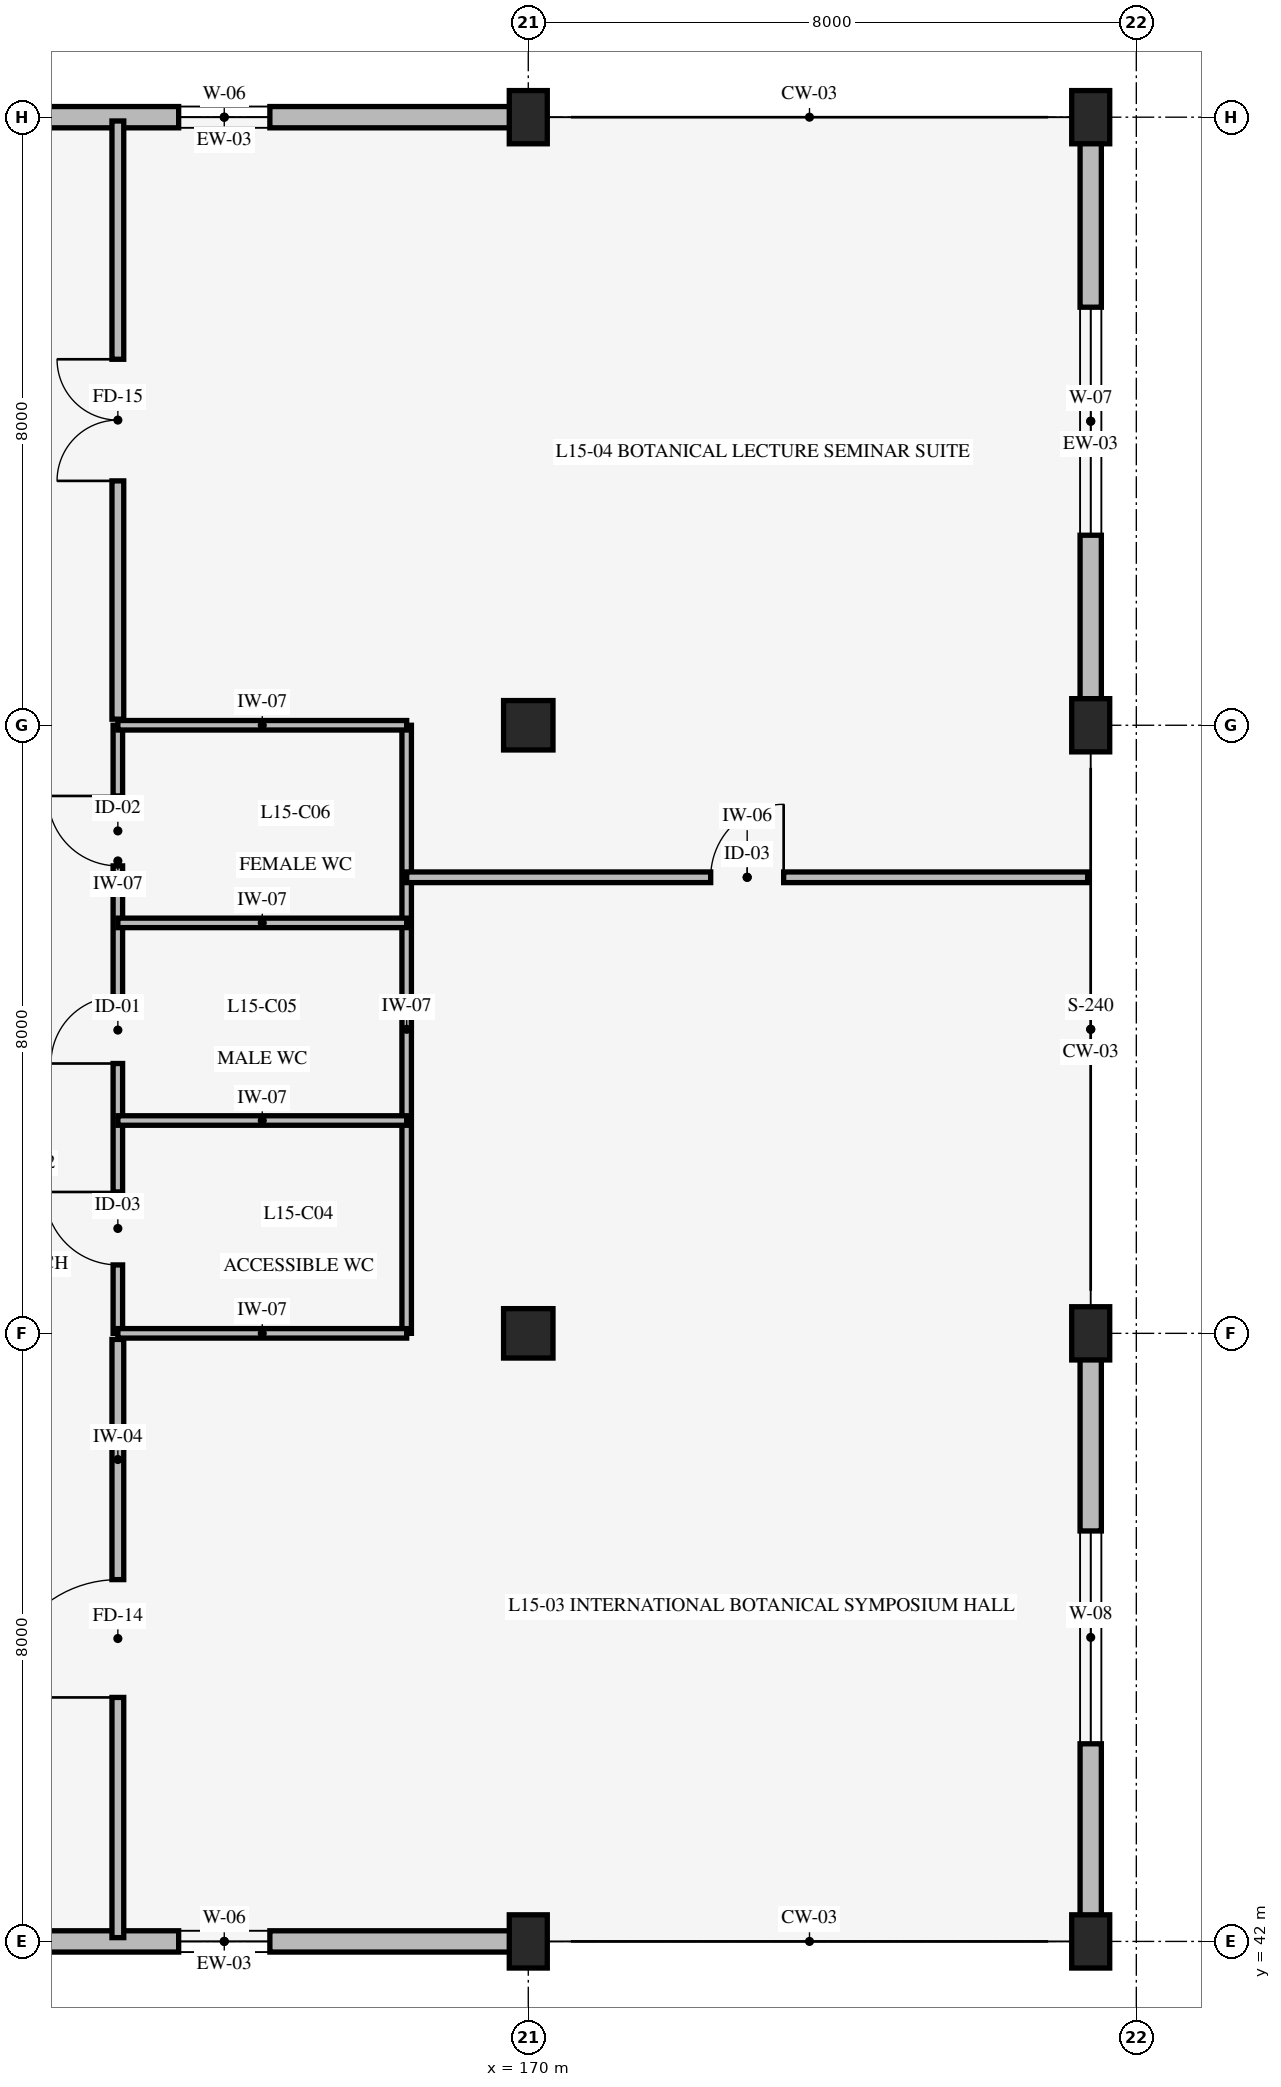
"""IFC4 building model, lengths in metres.
Left out: names, types, materials, properties, quantities, classifications, styles, units other than length and angle.
Written with IfcOpenShell. Run it as: python <this file> out.ifc"""

import sys

from ifc_helpers import new_model, si_unit, direction, frame, frame_2d, origin, origin_2d, place, context, subcontext, project, spatial, rectangle, extrude, element, fill, save


model = new_model("IFC4")
c1 = context("Model", 3, precision=1e-05, world=origin(), true_north=direction((0.0, 1.0)))
c2 = subcontext(c1, "Body", "Model", "MODEL_VIEW")
j1 = project(units=[si_unit("LENGTHUNIT", "METRE"), si_unit("PLANEANGLEUNIT", "RADIAN")], contexts=[c1])
p1 = place(None, origin())
s1 = spatial("IfcSite", under=j1, at=p1, CompositionType="ELEMENT")
p2 = place(p1, origin())
s2 = spatial("IfcBuilding", under=s1, at=p2, CompositionType="ELEMENT")
p3 = place(p2, frame((0.0, 0.0, 61.2)))
s3 = spatial("IfcBuildingStorey", under=s2, at=p3, CompositionType="ELEMENT", Elevation=61.2)
p4 = place(p3, frame((170.0, 42.0, 0.0), z_axis=(0.0, 0.0, 1.0), x_axis=(1.0, 0.0, 0.0)))
e1 = element("IfcColumn", 1, at=p4, inside=s3, PredefinedType="COLUMN", context=c2, shape_type="SweptSolid", body=[
    extrude(rectangle(XDim=0.5, YDim=0.7, at=origin_2d()), origin(), (0.0, 0.0, 1.0), 4.2),
])
for number, where, z_axis, x_axis in (
    (2, (170.0, 50.0, 0.0), (0.0, 0.0, 1.0), (1.0, 0.0, 0.0)),
    (3, (170.0, 58.0, 0.0), (0.0, 0.0, 1.0), (1.0, 0.0, 0.0)),
):
    element("IfcColumn", number, at=place(p3, frame(where, z_axis=z_axis, x_axis=x_axis)), inside=s3, PredefinedType="COLUMN", context=c2, shape_type="SweptSolid", body=[
        extrude(rectangle(XDim=0.65, YDim=0.65, at=origin_2d()), origin(), (0.0, 0.0, 1.0), 4.2),
    ])
for number, where, z_axis, x_axis in (
    (4, (170.0, 66.0, 0.0), (0.0, 0.0, 1.0), (1.0, 0.0, 0.0)),
    (5, (177.4, 42.0, 0.0), (0.0, 0.0, 1.0), (1.0, 0.0, 0.0)),
    (6, (177.4, 50.0, 0.0), (0.0, 0.0, 1.0), (1.0, 0.0, 0.0)),
    (7, (177.4, 58.0, 0.0), (0.0, 0.0, 1.0), (1.0, 0.0, 0.0)),
    (8, (177.4, 66.0, 0.0), (0.0, 0.0, 1.0), (1.0, 0.0, 0.0)),
):
    element("IfcColumn", number, at=place(p3, frame(where, z_axis=z_axis, x_axis=x_axis)), inside=s3, PredefinedType="COLUMN", context=c2, shape_type="SweptSolid", body=[
        extrude(rectangle(XDim=0.5, YDim=0.7, at=origin_2d()), origin(), (0.0, 0.0, 1.0), 4.2),
    ])
p5 = place(p3, frame((170.0, 42.0, 0.0), z_axis=(0.0, 0.0, 1.0), x_axis=(-1.0, 0.0, 0.0)))
e9 = element("IfcWall", 9, at=p5, inside=s3, PredefinedType="STANDARD", context=c2, shape_type="SweptSolid", body=[
    extrude(rectangle(XDim=8.0, YDim=0.28, at=frame_2d((4.0, 0.0))), origin(), (0.0, 0.0, 1.0), 3.24),
])
p6 = place(p5, frame((3.4, 0.0, 0.85)))
e10 = element("IfcOpeningElement", 10, at=p6, cuts=e9, PredefinedType="OPENING", context=c2, shape_type="SweptSolid", body=[
    extrude(rectangle(XDim=1.2, YDim=1.2, at=frame_2d((0.6, 0.6))), frame((0.0, 0.15, 0.0), z_axis=(0.0, -1.0, 0.0), x_axis=(1.0, 0.0, 0.0)), (0.0, 0.0, 1.0), 0.3),
])
p7 = place(p3, frame((162.0, 66.0, 0.0), z_axis=(0.0, 0.0, 1.0), x_axis=(1.0, 0.0, 0.0)))
e11 = element("IfcWall", 11, at=p7, inside=s3, PredefinedType="STANDARD", context=c2, shape_type="SweptSolid", body=[
    extrude(rectangle(XDim=8.0, YDim=0.28, at=frame_2d((4.0, 0.0))), origin(), (0.0, 0.0, 1.0), 3.24),
])
p8 = place(p7, frame((3.4, 0.0, 0.85)))
e12 = element("IfcOpeningElement", 12, at=p8, cuts=e11, PredefinedType="OPENING", context=c2, shape_type="SweptSolid", body=[
    extrude(rectangle(XDim=1.2, YDim=1.2, at=frame_2d((0.6, 0.6))), frame((0.0, 0.15, 0.0), z_axis=(0.0, -1.0, 0.0), x_axis=(1.0, 0.0, 0.0)), (0.0, 0.0, 1.0), 0.3),
])
p9 = place(p3, frame((177.4, 66.0, 0.0), z_axis=(0.0, 0.0, 1.0), x_axis=(0.0, -1.0, 0.0)))
e13 = element("IfcWall", 13, at=p9, inside=s3, PredefinedType="STANDARD", context=c2, shape_type="SweptSolid", body=[
    extrude(rectangle(XDim=8.0, YDim=0.28, at=frame_2d((4.0, 0.0))), origin(), (0.0, 0.0, 1.0), 3.29),
])
p10 = place(p9, frame((2.5, 0.0, 0.85)))
e14 = element("IfcOpeningElement", 14, at=p10, cuts=e13, PredefinedType="OPENING", context=c2, shape_type="SweptSolid", body=[
    extrude(rectangle(XDim=3.0, YDim=1.8, at=frame_2d((1.5, 0.9))), frame((0.0, 0.15, 0.0), z_axis=(0.0, -1.0, 0.0), x_axis=(1.0, 0.0, 0.0)), (0.0, 0.0, 1.0), 0.3),
])
p11 = place(p3, frame((177.4, 50.0, 0.0), z_axis=(0.0, 0.0, 1.0), x_axis=(0.0, -1.0, 0.0)))
e15 = element("IfcWall", 15, at=p11, inside=s3, PredefinedType="STANDARD", context=c2, shape_type="SweptSolid", body=[
    extrude(rectangle(XDim=8.0, YDim=0.28, at=frame_2d((4.0, 0.0))), origin(), (0.0, 0.0, 1.0), 3.29),
])
p12 = place(p11, frame((2.6, 0.0, 0.85)))
e16 = element("IfcOpeningElement", 16, at=p12, cuts=e15, PredefinedType="OPENING", context=c2, shape_type="SweptSolid", body=[
    extrude(rectangle(XDim=2.8, YDim=1.6, at=frame_2d((1.4, 0.8))), frame((0.0, 0.15, 0.0), z_axis=(0.0, -1.0, 0.0), x_axis=(1.0, 0.0, 0.0)), (0.0, 0.0, 1.0), 0.3),
])
p13 = place(p3, frame((164.6, 50.0, 0.0), z_axis=(0.0, 0.0, 1.0), x_axis=(0.0, 1.0, 0.0)))
e17 = element("IfcWall", 17, at=p13, inside=s3, PredefinedType="STANDARD", context=c2, shape_type="SweptSolid", body=[
    extrude(rectangle(XDim=8.0, YDim=0.125, at=frame_2d((4.0, 0.0))), origin(), (0.0, 0.0, 1.0), 3.9),
])
p14 = place(p13, frame((0.9, 0.0, 0.0)))
e18 = element("IfcOpeningElement", 18, at=p14, cuts=e17, PredefinedType="OPENING", context=c2, shape_type="SweptSolid", body=[
    extrude(rectangle(XDim=0.96, YDim=2.08, at=frame_2d((0.48, 1.04))), frame((0.0, 0.073, 0.0), z_axis=(0.0, -1.0, 0.0), x_axis=(1.0, 0.0, 0.0)), (0.0, 0.0, 1.0), 0.145),
])
p15 = place(p13, frame((3.55, 0.0, 0.0)))
e19 = element("IfcOpeningElement", 19, at=p15, cuts=e17, PredefinedType="OPENING", context=c2, shape_type="SweptSolid", body=[
    extrude(rectangle(XDim=0.88, YDim=2.05, at=frame_2d((0.44, 1.025))), frame((0.0, 0.073, 0.0), z_axis=(0.0, -1.0, 0.0), x_axis=(1.0, 0.0, 0.0)), (0.0, 0.0, 1.0), 0.145),
])
p16 = place(p13, frame((6.15, 0.0, 0.0)))
e20 = element("IfcOpeningElement", 20, at=p16, cuts=e17, PredefinedType="OPENING", context=c2, shape_type="SweptSolid", body=[
    extrude(rectangle(XDim=0.92, YDim=2.05, at=frame_2d((0.46, 1.025))), frame((0.0, 0.073, 0.0), z_axis=(0.0, -1.0, 0.0), x_axis=(1.0, 0.0, 0.0)), (0.0, 0.0, 1.0), 0.145),
])
p17 = place(p3, frame((168.4, 50.0, 0.0), z_axis=(0.0, 0.0, 1.0), x_axis=(0.0, 1.0, 0.0)))
e21 = element("IfcWall", 21, at=p17, inside=s3, PredefinedType="STANDARD", context=c2, shape_type="SweptSolid", body=[
    extrude(rectangle(XDim=8.0, YDim=0.125, at=frame_2d((4.0, 0.0))), origin(), (0.0, 0.0, 1.0), 3.9),
])
p18 = place(p3, frame((164.6, 50.0, 0.0), z_axis=(0.0, 0.0, 1.0), x_axis=(1.0, 0.0, 0.0)))
e22 = element("IfcWall", 22, at=p18, inside=s3, PredefinedType="STANDARD", context=c2, shape_type="SweptSolid", body=[
    extrude(rectangle(XDim=3.8, YDim=0.125, at=frame_2d((1.9, 0.0))), origin(), (0.0, 0.0, 1.0), 3.24),
])
for number, where, z_axis, x_axis in (
    (23, (164.6, 52.8, 0.0), (0.0, 0.0, 1.0), (1.0, 0.0, 0.0)),
    (24, (164.6, 55.4, 0.0), (0.0, 0.0, 1.0), (1.0, 0.0, 0.0)),
):
    element("IfcWall", number, at=place(p3, frame(where, z_axis=z_axis, x_axis=x_axis)), inside=s3, PredefinedType="STANDARD", context=c2, shape_type="SweptSolid", body=[
        extrude(rectangle(XDim=3.8, YDim=0.125, at=frame_2d((1.9, 0.0))), origin(), (0.0, 0.0, 1.0), 3.9),
    ])
p19 = place(p3, frame((164.6, 58.0, 0.0), z_axis=(0.0, 0.0, 1.0), x_axis=(1.0, 0.0, 0.0)))
e25 = element("IfcWall", 25, at=p19, inside=s3, PredefinedType="STANDARD", context=c2, shape_type="SweptSolid", body=[
    extrude(rectangle(XDim=3.8, YDim=0.125, at=frame_2d((1.9, 0.0))), origin(), (0.0, 0.0, 1.0), 3.24),
])
p20 = place(p3, frame((164.6, 42.05, 0.0), z_axis=(0.0, 0.0, 1.0), x_axis=(0.0, 1.0, 0.0)))
e26 = element("IfcWall", 26, at=p20, inside=s3, PredefinedType="STANDARD", context=c2, shape_type="SweptSolid", body=[
    extrude(rectangle(XDim=7.87, YDim=0.155, at=frame_2d((3.935, 0.0))), origin(), (0.0, 0.0, 1.0), 3.9),
])
p21 = place(p20, frame((3.16, 0.0, 0.0)))
e27 = element("IfcOpeningElement", 27, at=p21, cuts=e26, PredefinedType="OPENING", context=c2, shape_type="SweptSolid", body=[
    extrude(rectangle(XDim=1.55, YDim=2.25, at=frame_2d((0.775, 1.125))), frame((0.0, 0.087, 0.0), z_axis=(0.0, -1.0, 0.0), x_axis=(1.0, 0.0, 0.0)), (0.0, 0.0, 1.0), 0.175),
])
p22 = place(p3, frame((168.4, 56.0, 0.0), z_axis=(0.0, 0.0, 1.0), x_axis=(1.0, 0.0, 0.0)))
e28 = element("IfcWall", 28, at=p22, inside=s3, PredefinedType="STANDARD", context=c2, shape_type="SweptSolid", body=[
    extrude(rectangle(XDim=8.96, YDim=0.14, at=frame_2d((4.48, 0.0))), origin(), (0.0, 0.0, 1.0), 3.9),
])
p23 = place(p22, frame((4.0, 0.0, 0.0)))
e29 = element("IfcOpeningElement", 29, at=p23, cuts=e28, PredefinedType="OPENING", context=c2, shape_type="SweptSolid", body=[
    extrude(rectangle(XDim=0.96, YDim=2.08, at=frame_2d((0.48, 1.04))), frame((0.0, 0.08, 0.0), z_axis=(0.0, -1.0, 0.0), x_axis=(1.0, 0.0, 0.0)), (0.0, 0.0, 1.0), 0.16),
])
p24 = place(p3, frame((164.6, 58.08, 0.0), z_axis=(0.0, 0.0, 1.0), x_axis=(0.0, 1.0, 0.0)))
e30 = element("IfcWall", 30, at=p24, inside=s3, PredefinedType="STANDARD", context=c2, shape_type="SweptSolid", body=[
    extrude(rectangle(XDim=7.87, YDim=0.155, at=frame_2d((3.935, 0.0))), origin(), (0.0, 0.0, 1.0), 3.9),
])
p25 = place(p24, frame((3.135, 0.0, 0.0)))
e31 = element("IfcOpeningElement", 31, at=p25, cuts=e30, PredefinedType="OPENING", context=c2, shape_type="SweptSolid", body=[
    extrude(rectangle(XDim=1.6, YDim=2.25, at=frame_2d((0.8, 1.125))), frame((0.0, 0.087, 0.0), z_axis=(0.0, -1.0, 0.0), x_axis=(1.0, 0.0, 0.0)), (0.0, 0.0, 1.0), 0.175),
])
p26 = place(p6, origin())
e32 = element("IfcWindow", 32, at=p26, inside=s3, PartitioningType="SINGLE_PANEL", PredefinedType="WINDOW", context=c2, shape_type="SweptSolid", body=[
    extrude(rectangle(XDim=1.2, YDim=1.2, at=frame_2d((0.6, 0.6))), frame((0.0, 0.03, 0.0), z_axis=(0.0, -1.0, 0.0), x_axis=(1.0, 0.0, 0.0)), (0.0, 0.0, 1.0), 0.06),
])
fill(e10, e32)
p27 = place(p8, origin())
e33 = element("IfcWindow", 33, at=p27, inside=s3, PartitioningType="SINGLE_PANEL", PredefinedType="WINDOW", context=c2, shape_type="SweptSolid", body=[
    extrude(rectangle(XDim=1.2, YDim=1.2, at=frame_2d((0.6, 0.6))), frame((0.0, 0.03, 0.0), z_axis=(0.0, -1.0, 0.0), x_axis=(1.0, 0.0, 0.0)), (0.0, 0.0, 1.0), 0.06),
])
fill(e12, e33)
p28 = place(p10, origin())
e34 = element("IfcWindow", 34, at=p28, inside=s3, PartitioningType="SINGLE_PANEL", PredefinedType="WINDOW", context=c2, shape_type="SweptSolid", body=[
    extrude(rectangle(XDim=3.0, YDim=1.8, at=frame_2d((1.5, 0.9))), frame((0.0, 0.03, 0.0), z_axis=(0.0, -1.0, 0.0), x_axis=(1.0, 0.0, 0.0)), (0.0, 0.0, 1.0), 0.06),
])
fill(e14, e34)
p29 = place(p12, origin())
e35 = element("IfcWindow", 35, at=p29, inside=s3, PartitioningType="SINGLE_PANEL", PredefinedType="WINDOW", context=c2, shape_type="SweptSolid", body=[
    extrude(rectangle(XDim=2.8, YDim=1.6, at=frame_2d((1.4, 0.8))), frame((0.0, 0.03, 0.0), z_axis=(0.0, -1.0, 0.0), x_axis=(1.0, 0.0, 0.0)), (0.0, 0.0, 1.0), 0.06),
])
fill(e16, e35)
p30 = place(p14, origin())
e36 = element("IfcDoor", 36, at=p30, inside=s3, OperationType="SINGLE_SWING_RIGHT", PredefinedType="DOOR", context=c2, shape_type="SweptSolid", body=[
    extrude(rectangle(XDim=0.96, YDim=2.08, at=frame_2d((0.48, 1.04))), frame((0.0, 0.025, 0.0), z_axis=(0.0, -1.0, 0.0), x_axis=(1.0, 0.0, 0.0)), (0.0, 0.0, 1.0), 0.05),
])
fill(e18, e36)
p31 = place(p15, origin())
e37 = element("IfcDoor", 37, at=p31, inside=s3, OperationType="SINGLE_SWING_LEFT", PredefinedType="DOOR", context=c2, shape_type="SweptSolid", body=[
    extrude(rectangle(XDim=0.88, YDim=2.05, at=frame_2d((0.44, 1.025))), frame((0.0, 0.025, 0.0), z_axis=(0.0, -1.0, 0.0), x_axis=(1.0, 0.0, 0.0)), (0.0, 0.0, 1.0), 0.05),
])
fill(e19, e37)
p32 = place(p16, origin())
e38 = element("IfcDoor", 38, at=p32, inside=s3, OperationType="SINGLE_SWING_RIGHT", PredefinedType="DOOR", context=c2, shape_type="SweptSolid", body=[
    extrude(rectangle(XDim=0.92, YDim=2.05, at=frame_2d((0.46, 1.025))), frame((0.0, 0.025, 0.0), z_axis=(0.0, -1.0, 0.0), x_axis=(1.0, 0.0, 0.0)), (0.0, 0.0, 1.0), 0.05),
])
fill(e20, e38)
p33 = place(p21, origin())
e39 = element("IfcDoor", 39, at=p33, inside=s3, OperationType="SINGLE_SWING_LEFT", PredefinedType="DOOR", context=c2, shape_type="SweptSolid", body=[
    extrude(rectangle(XDim=1.55, YDim=2.25, at=frame_2d((0.775, 1.125))), frame((0.0, 0.025, 0.0), z_axis=(0.0, -1.0, 0.0), x_axis=(1.0, 0.0, 0.0)), (0.0, 0.0, 1.0), 0.05),
])
fill(e27, e39)
p34 = place(p23, origin())
e40 = element("IfcDoor", 40, at=p34, inside=s3, OperationType="SINGLE_SWING_RIGHT", PredefinedType="DOOR", context=c2, shape_type="SweptSolid", body=[
    extrude(rectangle(XDim=0.96, YDim=2.08, at=frame_2d((0.48, 1.04))), frame((0.0, 0.025, 0.0), z_axis=(0.0, -1.0, 0.0), x_axis=(1.0, 0.0, 0.0)), (0.0, 0.0, 1.0), 0.05),
])
fill(e29, e40)
p35 = place(p25, origin())
e41 = element("IfcDoor", 41, at=p35, inside=s3, OperationType="DOUBLE_DOOR_SINGLE_SWING", PredefinedType="DOOR", context=c2, shape_type="SweptSolid", body=[
    extrude(rectangle(XDim=1.6, YDim=2.25, at=frame_2d((0.8, 1.125))), frame((0.0, 0.025, 0.0), z_axis=(0.0, -1.0, 0.0), x_axis=(1.0, 0.0, 0.0)), (0.0, 0.0, 1.0), 0.05),
])
fill(e31, e41)
save(model, sys.argv[1])
